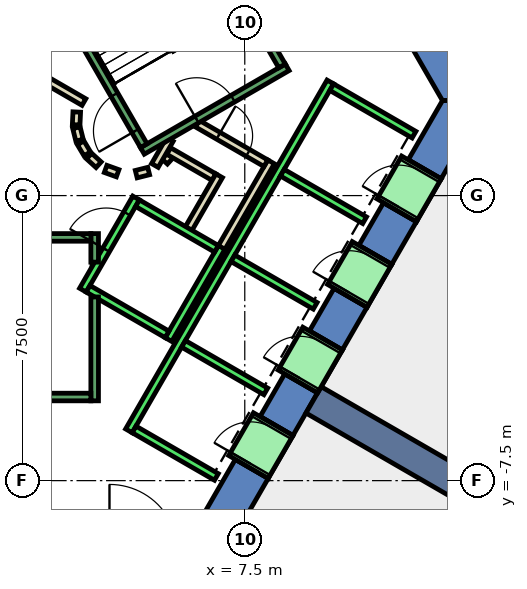
"""IFC4 building model, lengths in metres.
Left out: names, types, materials, properties, quantities, classifications, styles, units other than length and angle.
Written with IfcOpenShell. Run it as: python <this file> out.ifc"""

import sys

from ifc_helpers import new_model, si_unit, direction, frame, frame_2d, origin, place, context, subcontext, project, spatial, polyline, rectangle, outline, extrude, element, fill, save


model = new_model("IFC4")
c1 = context("Model", 3, precision=1e-05, world=origin(), true_north=direction((0.0, 1.0)))
c2 = subcontext(c1, "Body", "Model", "MODEL_VIEW")
j1 = project(units=[si_unit("LENGTHUNIT", "METRE"), si_unit("PLANEANGLEUNIT", "RADIAN")], contexts=[c1])
p1 = place(None, origin())
s1 = spatial("IfcSite", under=j1, at=p1, CompositionType="ELEMENT")
p2 = place(p1, origin())
s2 = spatial("IfcBuilding", under=s1, at=p2, CompositionType="ELEMENT")
p3 = place(p2, frame((0.0, 0.0, 15.0)))
s3 = spatial("IfcBuildingStorey", under=s2, at=p3, CompositionType="ELEMENT", Elevation=15.0)
p4 = place(p3, frame((0.0, 0.0, -0.45)))
e1 = element("IfcWall", 1, at=p4, inside=s3, PredefinedType="SHEAR", context=c2, shape_type="SweptSolid", body=[
    extrude(outline(polyline([(8.517, 11.748), (7.651, 11.248), (12.702, 2.5), (13.856, 2.5), (8.517, 11.748)])), origin(), (0.0, 0.0, 1.0), 5.0),
])
p5 = place(p3, frame((0.0, 0.0, -0.45)))
e2 = element("IfcWall", 2, at=p5, inside=s3, PredefinedType="SHEAR", context=c2, shape_type="SweptSolid", body=[
    extrude(outline(polyline([(8.117, -7.44), (7.252, -6.94), (6.351, -8.5), (6.928, -9.5), (8.117, -7.44)])), origin(), (0.0, 0.0, 1.0), 5.0),
])
p6 = place(p3, frame((0.0, 0.0, -0.45)))
e3 = element("IfcWall", 3, at=p6, inside=s3, PredefinedType="SHEAR", context=c2, shape_type="SweptSolid", body=[
    extrude(outline(polyline([(9.417, -5.189), (8.551, -4.689), (7.902, -5.814), (8.767, -6.314), (9.417, -5.189)])), origin(), (0.0, 0.0, 1.0), 5.0),
])
p7 = place(p3, frame((0.0, 0.0, -0.45)))
e4 = element("IfcWall", 4, at=p7, inside=s3, PredefinedType="SHEAR", context=c2, shape_type="SweptSolid", body=[
    extrude(outline(polyline([(10.717, -2.937), (9.851, -2.437), (9.201, -3.563), (10.067, -4.063), (10.717, -2.937)])), origin(), (0.0, 0.0, 1.0), 5.0),
])
p8 = place(p3, frame((0.0, 0.0, -0.45)))
e5 = element("IfcWall", 5, at=p8, inside=s3, PredefinedType="SHEAR", context=c2, shape_type="SweptSolid", body=[
    extrude(outline(polyline([(12.017, -0.686), (11.151, -0.186), (10.501, -1.311), (11.367, -1.811), (12.017, -0.686)])), origin(), (0.0, 0.0, 1.0), 5.0),
])
p9 = place(p3, frame((0.0, 0.0, -0.45)))
e6 = element("IfcWall", 6, at=p9, inside=s3, PredefinedType="SHEAR", context=c2, shape_type="SweptSolid", body=[
    extrude(outline(polyline([(11.801, 0.94), (12.667, 0.44), (13.856, 2.5), (12.702, 2.5), (11.801, 0.94)])), origin(), (0.0, 0.0, 1.0), 5.0),
])
p10 = place(p3, frame((0.0, 0.0, 3.6)))
e7 = element("IfcWall", 7, at=p10, inside=s3, PredefinedType="SHEAR", context=c2, shape_type="SweptSolid", body=[
    extrude(outline(polyline([(8.767, -6.314), (7.902, -5.814), (7.252, -6.94), (8.117, -7.44), (8.767, -6.314)])), origin(), (0.0, 0.0, 1.0), 0.95),
])
p11 = place(p3, frame((0.0, 0.0, 3.6)))
e8 = element("IfcWall", 8, at=p11, inside=s3, PredefinedType="SHEAR", context=c2, shape_type="SweptSolid", body=[
    extrude(outline(polyline([(10.067, -4.063), (9.201, -3.563), (8.551, -4.689), (9.417, -5.189), (10.067, -4.063)])), origin(), (0.0, 0.0, 1.0), 0.95),
])
p12 = place(p3, frame((0.0, 0.0, 3.6)))
e9 = element("IfcWall", 9, at=p12, inside=s3, PredefinedType="SHEAR", context=c2, shape_type="SweptSolid", body=[
    extrude(outline(polyline([(11.367, -1.811), (10.501, -1.311), (9.851, -2.437), (10.717, -2.937), (11.367, -1.811)])), origin(), (0.0, 0.0, 1.0), 0.95),
])
p13 = place(p3, frame((0.0, 0.0, 3.6)))
e10 = element("IfcWall", 10, at=p13, inside=s3, PredefinedType="SHEAR", context=c2, shape_type="SweptSolid", body=[
    extrude(outline(polyline([(12.667, 0.44), (11.801, 0.94), (11.151, -0.186), (12.017, -0.686), (12.667, 0.44)])), origin(), (0.0, 0.0, 1.0), 0.95),
])
p14 = place(p3, frame((9.31, -5.375, -0.45), z_axis=(0.0, 0.0, 1.0), x_axis=(0.866017533419, -0.500013631625, 0.0)))
e11 = element("IfcWall", 11, at=p14, inside=s3, PredefinedType="SHEAR", context=c2, shape_type="SweptSolid", body=[
    extrude(rectangle(XDim=9.0, YDim=0.8, at=frame_2d((4.5, 0.0))), origin(), (0.0, 0.0, 1.0), 5.0),
])
p15 = place(p3, frame((5.39, 0.898, 0.0), z_axis=(0.0, 0.0, 1.0), x_axis=(0.673828488714, 0.738887791073, 0.0)))
e12 = element("IfcWall", 12, at=p15, inside=s3, PredefinedType="PARTITIONING", context=c2, shape_type="SweptSolid", body=[
    extrude(rectangle(XDim=0.263, YDim=0.2, at=frame_2d((0.131, 0.0))), origin(), (0.0, 0.0, 1.0), 4.55),
])
p16 = place(p3, frame((5.499, 1.172, 0.0), z_axis=(0.0, 0.0, 1.0), x_axis=(0.866333505267, -0.499465972466, 0.0)))
e13 = element("IfcWall", 13, at=p16, inside=s3, PredefinedType="PARTITIONING", context=c2, shape_type="SweptSolid", body=[
    extrude(rectangle(XDim=1.374, YDim=0.2, at=frame_2d((0.687, 0.0))), origin(), (0.0, 0.0, 1.0), 4.55),
])
p17 = place(p3, frame((6.826, 0.522, 0.0), z_axis=(0.0, 0.0, 1.0), x_axis=(-0.500016722714, -0.866015748706, 0.0)))
e14 = element("IfcWall", 14, at=p17, inside=s3, PredefinedType="PARTITIONING", context=c2, shape_type="SweptSolid", body=[
    extrude(rectangle(XDim=1.7, YDim=0.2, at=frame_2d((0.85, 0.0))), origin(), (0.0, 0.0, 1.0), 4.55),
])
p18 = place(p3, frame((8.192, 0.888, 0.0), z_axis=(0.0, 0.0, 1.0), x_axis=(-0.499940625693, -0.866059680843, 0.0)))
e15 = element("IfcWall", 15, at=p18, inside=s3, PredefinedType="PARTITIONING", context=c2, shape_type="SweptSolid", body=[
    extrude(rectangle(XDim=2.68, YDim=0.2, at=frame_2d((1.34, 0.0))), origin(), (0.0, 0.0, 1.0), 4.55),
])
p19 = place(p3, frame((5.135, 0.793, 0.0), z_axis=(0.0, 0.0, 1.0), x_axis=(0.499526442893, 0.866298639529, 0.0)))
e16 = element("IfcWall", 16, at=p19, inside=s3, PredefinedType="PARTITIONING", context=c2, shape_type="SweptSolid", body=[
    extrude(rectangle(XDim=0.791, YDim=0.2, at=frame_2d((0.396, 0.0))), origin(), (0.0, 0.0, 1.0), 4.55),
])
p20 = place(p3, frame((6.25, 1.894, 0.0), z_axis=(0.0, 0.0, 1.0), x_axis=(0.866043184279, -0.499969202016, 0.0)))
e17 = element("IfcWall", 17, at=p20, inside=s3, PredefinedType="PARTITIONING", context=c2, shape_type="SweptSolid", body=[
    extrude(rectangle(XDim=2.084, YDim=0.2, at=frame_2d((1.042, 0.0))), origin(), (0.0, 0.0, 1.0), 4.55),
])
p21 = place(p20, frame((0.642, 0.0, 0.0)))
e18 = element("IfcOpeningElement", 18, at=p21, cuts=e17, PredefinedType="OPENING", context=c2, shape_type="SweptSolid", body=[
    extrude(rectangle(XDim=0.9, YDim=2.1, at=frame_2d((0.45, 1.05))), frame((0.0, 0.11, 0.0), z_axis=(0.0, -1.0, 0.0), x_axis=(1.0, 0.0, 0.0)), (0.0, 0.0, 1.0), 0.22),
])
p22 = place(p3, frame((3.079, 2.199, 0.0), z_axis=(0.0, 0.0, 1.0), x_axis=(-0.047771483479, -0.998858290933, 0.0)))
e19 = element("IfcWall", 19, at=p22, inside=s3, PredefinedType="PARTITIONING", context=c2, shape_type="SweptSolid", body=[
    extrude(rectangle(XDim=0.337, YDim=0.2, at=frame_2d((0.169, 0.0))), origin(), (0.0, 0.0, 1.0), 4.55),
])
p23 = place(p3, frame((3.07, 1.786, 0.0), z_axis=(0.0, 0.0, 1.0), x_axis=(0.242705583207, -0.970099994784, 0.0)))
e20 = element("IfcWall", 20, at=p23, inside=s3, PredefinedType="PARTITIONING", context=c2, shape_type="SweptSolid", body=[
    extrude(rectangle(XDim=0.338, YDim=0.2, at=frame_2d((0.169, 0.0))), origin(), (0.0, 0.0, 1.0), 4.55),
])
for number, where, z_axis, x_axis in (
    (21, (3.182, 1.388, 0.0), (0.0, 0.0, 1.0), (0.512, -0.859, 0.0)),
    (22, (3.404, 1.039, 0.0), (0.0, 0.0, 1.0), (0.74, -0.672, 0.0)),
):
    element("IfcWall", number, at=place(p3, frame(where, z_axis=z_axis, x_axis=x_axis)), inside=s3, PredefinedType="PARTITIONING", context=c2, shape_type="SweptSolid", body=[
        extrude(rectangle(XDim=0.338, YDim=0.2, at=frame_2d((0.169, 0.0))), origin(), (0.0, 0.0, 1.0), 4.55),
    ])
p24 = place(p3, frame((3.838, 0.702, 0.0), z_axis=(0.0, 0.0, 1.0), x_axis=(0.941035081519, -0.338308993895, 0.0)))
e23 = element("IfcWall", 23, at=p24, inside=s3, PredefinedType="PARTITIONING", context=c2, shape_type="SweptSolid", body=[
    extrude(rectangle(XDim=0.337, YDim=0.2, at=frame_2d((0.168, 0.0))), origin(), (0.0, 0.0, 1.0), 4.55),
])
p25 = place(p3, frame((4.644, 0.564, 0.0), z_axis=(0.0, 0.0, 1.0), x_axis=(0.969929076366, 0.243387729394, 0.0)))
e24 = element("IfcWall", 24, at=p25, inside=s3, PredefinedType="PARTITIONING", context=c2, shape_type="SweptSolid", body=[
    extrude(rectangle(XDim=0.337, YDim=0.2, at=frame_2d((0.168, 0.0))), origin(), (0.0, 0.0, 1.0), 4.55),
])
p26 = place(p3, frame((2.012, 3.186, 0.0), z_axis=(0.0, 0.0, 1.0), x_axis=(0.865891012941, -0.500232699559, 0.0)))
e25 = element("IfcWall", 25, at=p26, inside=s3, PredefinedType="PARTITIONING", context=c2, shape_type="SweptSolid", body=[
    extrude(rectangle(XDim=1.449, YDim=0.2, at=frame_2d((0.725, 0.0))), origin(), (0.0, 0.0, 1.0), 4.55),
])
p27 = place(p3, frame((3.24, -2.488, 0.0), z_axis=(0.0, 0.0, 1.0), x_axis=(0.49994636267, 0.866056369097, 0.0)))
e26 = element("IfcWall", 26, at=p27, inside=s3, PredefinedType="STANDARD", context=c2, shape_type="SweptSolid", body=[
    extrude(rectangle(XDim=2.8, YDim=0.2, at=frame_2d((1.4, 0.0))), origin(), (0.0, 0.0, 1.0), 4.55),
])
p28 = place(p27, frame((1.225, 0.0, 0.0)))
e27 = element("IfcOpeningElement", 27, at=p28, cuts=e26, PredefinedType="OPENING", context=c2, shape_type="SweptSolid", body=[
    extrude(rectangle(XDim=1.1, YDim=2.1, at=frame_2d((0.55, 1.05))), frame((0.0, 0.11, 0.0), z_axis=(0.0, -1.0, 0.0), x_axis=(1.0, 0.0, 0.0)), (0.0, 0.0, 1.0), 0.22),
])
p29 = place(p3, frame((5.492, -3.788, 0.0), z_axis=(0.0, 0.0, 1.0), x_axis=(0.500011755427, 0.866018616679, 0.0)))
e28 = element("IfcWall", 28, at=p29, inside=s3, PredefinedType="STANDARD", context=c2, shape_type="SweptSolid", body=[
    extrude(rectangle(XDim=2.8, YDim=0.2, at=frame_2d((1.4, 0.0))), origin(), (0.0, 0.0, 1.0), 4.55),
])
p30 = place(p3, frame((3.377, -2.452, 0.0), z_axis=(0.0, 0.0, 1.0), x_axis=(0.865955154139, -0.50012165622, 0.0)))
e29 = element("IfcWall", 29, at=p30, inside=s3, PredefinedType="STANDARD", context=c2, shape_type="SweptSolid", body=[
    extrude(rectangle(XDim=2.4, YDim=0.2, at=frame_2d((1.2, 0.0))), origin(), (0.0, 0.0, 1.0), 4.55),
])
p31 = place(p3, frame((4.677, -0.2, 0.0), z_axis=(0.0, 0.0, 1.0), x_axis=(0.865973769406, -0.500089422704, 0.0)))
e30 = element("IfcWall", 30, at=p31, inside=s3, PredefinedType="STANDARD", context=c2, shape_type="SweptSolid", body=[
    extrude(rectangle(XDim=2.399, YDim=0.2, at=frame_2d((1.2, 0.0))), origin(), (0.0, 0.0, 1.0), 4.55),
])
p32 = place(p3, frame((4.451, -6.19, 0.0), z_axis=(0.0, 0.0, 1.0), x_axis=(0.50000090737, 0.866024879913, 0.0)))
e31 = element("IfcWall", 31, at=p32, inside=s3, PredefinedType="STANDARD", context=c2, shape_type="SweptSolid", body=[
    extrude(rectangle(XDim=10.6, YDim=0.2, at=frame_2d((5.3, 0.0))), origin(), (0.0, 0.0, 1.0), 4.55),
])
for number, where, z_axis, x_axis in (
    (32, (4.588, -6.153, 0.0), (0.0, 0.0, 1.0), (0.866, -0.5, 0.0)),
    (33, (5.888, -3.902, 0.0), (0.0, 0.0, 1.0), (0.866, -0.5, 0.0)),
    (34, (7.188, -1.65, 0.0), (0.0, 0.0, 1.0), (0.866, -0.5, 0.0)),
    (35, (8.488, 0.602, 0.0), (0.0, 0.0, 1.0), (0.866, -0.5, 0.0)),
):
    element("IfcWall", number, at=place(p3, frame(where, z_axis=z_axis, x_axis=x_axis)), inside=s3, PredefinedType="STANDARD", context=c2, shape_type="SweptSolid", body=[
        extrude(rectangle(XDim=2.5, YDim=0.2, at=frame_2d((1.25, 0.0))), origin(), (0.0, 0.0, 1.0), 4.55),
    ])
p33 = place(p3, frame((9.788, 2.853, 0.0), z_axis=(0.0, 0.0, 1.0), x_axis=(0.865998541277, -0.500046524342, 0.0)))
e36 = element("IfcWall", 36, at=p33, inside=s3, PredefinedType="STANDARD", context=c2, shape_type="SweptSolid", body=[
    extrude(rectangle(XDim=2.5, YDim=0.2, at=frame_2d((1.25, 0.0))), origin(), (0.0, 0.0, 1.0), 4.55),
])
p34 = place(p3, frame((7.598, -7.14, 0.0), z_axis=(0.0, 0.0, 1.0), x_axis=(0.500362116554, 0.865816234728, 0.0)))
e37 = element("IfcWall", 37, at=p34, inside=s3, PredefinedType="STANDARD", context=c2, shape_type="SweptSolid", body=[
    extrude(rectangle(XDim=1.299, YDim=1.2, at=frame_2d((0.65, 0.0))), origin(), (0.0, 0.0, 1.0), 2.4),
])
p35 = place(p34, frame((0.1, 0.0, 0.0)))
e38 = element("IfcOpeningElement", 38, at=p35, cuts=e37, PredefinedType="OPENING", context=c2, shape_type="SweptSolid", body=[
    extrude(rectangle(XDim=1.1, YDim=2.3, at=frame_2d((0.55, 1.15))), frame((0.0, 0.61, 0.0), z_axis=(0.0, -1.0, 0.0), x_axis=(1.0, 0.0, 0.0)), (0.0, 0.0, 1.0), 1.22),
])
p36 = place(p3, frame((8.898, -4.889, 0.0), z_axis=(0.0, 0.0, 1.0), x_axis=(0.500036693733, 0.866004217611, 0.0)))
e39 = element("IfcWall", 39, at=p36, inside=s3, PredefinedType="STANDARD", context=c2, shape_type="SweptSolid", body=[
    extrude(rectangle(XDim=1.3, YDim=1.2, at=frame_2d((0.65, 0.0))), origin(), (0.0, 0.0, 1.0), 2.4),
])
p37 = place(p36, frame((0.1, 0.0, 0.0)))
e40 = element("IfcOpeningElement", 40, at=p37, cuts=e39, PredefinedType="OPENING", context=c2, shape_type="SweptSolid", body=[
    extrude(rectangle(XDim=1.1, YDim=2.3, at=frame_2d((0.55, 1.15))), frame((0.0, 0.61, 0.0), z_axis=(0.0, -1.0, 0.0), x_axis=(1.0, 0.0, 0.0)), (0.0, 0.0, 1.0), 1.22),
])
p38 = place(p3, frame((10.198, -2.637, 0.0), z_axis=(0.0, 0.0, 1.0), x_axis=(0.49989585183, 0.866085525409, 0.0)))
e41 = element("IfcWall", 41, at=p38, inside=s3, PredefinedType="STANDARD", context=c2, shape_type="SweptSolid", body=[
    extrude(rectangle(XDim=1.3, YDim=1.2, at=frame_2d((0.65, 0.0))), origin(), (0.0, 0.0, 1.0), 2.4),
])
p39 = place(p38, frame((0.1, 0.0, 0.0)))
e42 = element("IfcOpeningElement", 42, at=p39, cuts=e41, PredefinedType="OPENING", context=c2, shape_type="SweptSolid", body=[
    extrude(rectangle(XDim=1.1, YDim=2.3, at=frame_2d((0.55, 1.15))), frame((0.0, 0.61, 0.0), z_axis=(0.0, -1.0, 0.0), x_axis=(1.0, 0.0, 0.0)), (0.0, 0.0, 1.0), 1.22),
])
p40 = place(p3, frame((11.498, -0.385, 0.0), z_axis=(0.0, 0.0, 1.0), x_axis=(0.500221244143, 0.865897630733, 0.0)))
e43 = element("IfcWall", 43, at=p40, inside=s3, PredefinedType="STANDARD", context=c2, shape_type="SweptSolid", body=[
    extrude(rectangle(XDim=1.299, YDim=1.2, at=frame_2d((0.65, 0.0))), origin(), (0.0, 0.0, 1.0), 2.4),
])
p41 = place(p40, frame((0.1, 0.0, 0.0)))
e44 = element("IfcOpeningElement", 44, at=p41, cuts=e43, PredefinedType="OPENING", context=c2, shape_type="SweptSolid", body=[
    extrude(rectangle(XDim=1.1, YDim=2.3, at=frame_2d((0.55, 1.15))), frame((0.0, 0.61, 0.0), z_axis=(0.0, -1.0, 0.0), x_axis=(1.0, 0.0, 0.0)), (0.0, 0.0, 1.0), 1.22),
])
p42 = place(p3, frame((3.55, -2.667, 0.0), z_axis=(0.0, 0.0, 1.0), x_axis=(0.0, -1.0, 0.0)))
e45 = element("IfcWall", 45, at=p42, inside=s3, PredefinedType="STANDARD", context=c2, shape_type="SweptSolid", body=[
    extrude(rectangle(XDim=2.733, YDim=0.2, at=frame_2d((1.366, 0.0))), origin(), (0.0, 0.0, 1.0), 4.55),
])
p43 = place(p3, frame((3.55, -1.0, 0.0), z_axis=(0.0, 0.0, 1.0), x_axis=(0.0, -1.0, 0.0)))
e46 = element("IfcWall", 46, at=p43, inside=s3, PredefinedType="STANDARD", context=c2, shape_type="SweptSolid", body=[
    extrude(rectangle(XDim=0.751, YDim=0.2, at=frame_2d((0.375, 0.0))), origin(), (0.0, 0.0, 1.0), 4.55),
])
p44 = place(p3, frame((-3.45, -1.1, 0.0), z_axis=(0.0, 0.0, 1.0), x_axis=(1.0, 0.0, 0.0)))
e47 = element("IfcWall", 47, at=p44, inside=s3, PredefinedType="STANDARD", context=c2, shape_type="SweptSolid", body=[
    extrude(rectangle(XDim=6.9, YDim=0.2, at=frame_2d((3.45, 0.0))), origin(), (0.0, 0.0, 1.0), 4.55),
])
p45 = place(p44, frame((0.45, 0.0, 0.0)))
e48 = element("IfcOpeningElement", 48, at=p45, cuts=e47, PredefinedType="OPENING", context=c2, shape_type="SweptSolid", body=[
    extrude(rectangle(XDim=1.1, YDim=2.2, at=frame_2d((0.55, 1.1))), frame((0.0, 0.11, 0.0), z_axis=(0.0, -1.0, 0.0), x_axis=(1.0, 0.0, 0.0)), (0.0, 0.0, 1.0), 0.22),
])
p46 = place(p3, frame((-3.45, -5.3, 0.0), z_axis=(0.0, 0.0, 1.0), x_axis=(1.0, 0.0, 0.0)))
e49 = element("IfcWall", 49, at=p46, inside=s3, PredefinedType="STANDARD", context=c2, shape_type="SweptSolid", body=[
    extrude(rectangle(XDim=6.9, YDim=0.2, at=frame_2d((3.45, 0.0))), origin(), (0.0, 0.0, 1.0), 4.55),
])
p47 = place(p3, frame((4.806, 1.176, 0.0), z_axis=(0.0, 0.0, 1.0), x_axis=(0.866059941101, 0.499940174841, 0.0)))
e50 = element("IfcWall", 50, at=p47, inside=s3, PredefinedType="STANDARD", context=c2, shape_type="SweptSolid", body=[
    extrude(rectangle(XDim=4.4, YDim=0.2, at=frame_2d((2.2, 0.0))), origin(), (0.0, 0.0, 1.0), 4.55),
])
p48 = place(p47, frame((1.65, 0.0, 0.0)))
e51 = element("IfcOpeningElement", 51, at=p48, cuts=e50, PredefinedType="OPENING", context=c2, shape_type="SweptSolid", body=[
    extrude(rectangle(XDim=1.1, YDim=2.2, at=frame_2d((0.55, 1.1))), frame((0.0, 0.11, 0.0), z_axis=(0.0, -1.0, 0.0), x_axis=(1.0, 0.0, 0.0)), (0.0, 0.0, 1.0), 0.22),
])
p49 = place(p3, frame((4.843, 1.312, 0.0), z_axis=(0.0, 0.0, 1.0), x_axis=(-0.499963383562, 0.866046543262, 0.0)))
e52 = element("IfcWall", 52, at=p49, inside=s3, PredefinedType="STANDARD", context=c2, shape_type="SweptSolid", body=[
    extrude(rectangle(XDim=6.9, YDim=0.2, at=frame_2d((3.45, 0.0))), origin(), (0.0, 0.0, 1.0), 4.55),
])
p50 = place(p49, frame((0.45, 0.0, 0.0)))
e53 = element("IfcOpeningElement", 53, at=p50, cuts=e52, PredefinedType="OPENING", context=c2, shape_type="SweptSolid", body=[
    extrude(rectangle(XDim=1.1, YDim=2.2, at=frame_2d((0.55, 1.1))), frame((0.0, 0.11, 0.0), z_axis=(0.0, -1.0, 0.0), x_axis=(1.0, 0.0, 0.0)), (0.0, 0.0, 1.0), 0.22),
])
p51 = place(p3, frame((8.48, 3.412, 0.0), z_axis=(0.0, 0.0, 1.0), x_axis=(-0.499978703459, 0.866037698999, 0.0)))
e54 = element("IfcWall", 54, at=p51, inside=s3, PredefinedType="STANDARD", context=c2, shape_type="SweptSolid", body=[
    extrude(rectangle(XDim=6.9, YDim=0.2, at=frame_2d((3.45, 0.0))), origin(), (0.0, 0.0, 1.0), 4.55),
])
p52 = place(p21, origin())
e55 = element("IfcDoor", 55, at=p52, inside=s3, OperationType="SINGLE_SWING_LEFT", PredefinedType="DOOR", context=c2, shape_type="SweptSolid", body=[
    extrude(rectangle(XDim=0.9, YDim=2.1, at=frame_2d((0.45, 1.05))), frame((0.0, 0.025, 0.0), z_axis=(0.0, -1.0, 0.0), x_axis=(1.0, 0.0, 0.0)), (0.0, 0.0, 1.0), 0.05),
])
fill(e18, e55)
p53 = place(p35, origin())
e56 = element("IfcDoor", 56, at=p53, inside=s3, OperationType="SLIDING_TO_LEFT", PredefinedType="DOOR", context=c2, shape_type="SweptSolid", body=[
    extrude(rectangle(XDim=1.1, YDim=2.3, at=frame_2d((0.55, 1.15))), frame((0.0, 0.025, 0.0), z_axis=(0.0, -1.0, 0.0), x_axis=(1.0, 0.0, 0.0)), (0.0, 0.0, 1.0), 0.05),
])
fill(e38, e56)
p54 = place(p37, origin())
e57 = element("IfcDoor", 57, at=p54, inside=s3, OperationType="SLIDING_TO_LEFT", PredefinedType="DOOR", context=c2, shape_type="SweptSolid", body=[
    extrude(rectangle(XDim=1.1, YDim=2.3, at=frame_2d((0.55, 1.15))), frame((0.0, 0.025, 0.0), z_axis=(0.0, -1.0, 0.0), x_axis=(1.0, 0.0, 0.0)), (0.0, 0.0, 1.0), 0.05),
])
fill(e40, e57)
p55 = place(p39, origin())
e58 = element("IfcDoor", 58, at=p55, inside=s3, OperationType="SLIDING_TO_LEFT", PredefinedType="DOOR", context=c2, shape_type="SweptSolid", body=[
    extrude(rectangle(XDim=1.1, YDim=2.3, at=frame_2d((0.55, 1.15))), frame((0.0, 0.025, 0.0), z_axis=(0.0, -1.0, 0.0), x_axis=(1.0, 0.0, 0.0)), (0.0, 0.0, 1.0), 0.05),
])
fill(e42, e58)
p56 = place(p41, origin())
e59 = element("IfcDoor", 59, at=p56, inside=s3, OperationType="SLIDING_TO_LEFT", PredefinedType="DOOR", context=c2, shape_type="SweptSolid", body=[
    extrude(rectangle(XDim=1.1, YDim=2.3, at=frame_2d((0.55, 1.15))), frame((0.0, 0.025, 0.0), z_axis=(0.0, -1.0, 0.0), x_axis=(1.0, 0.0, 0.0)), (0.0, 0.0, 1.0), 0.05),
])
fill(e44, e59)
p57 = place(p28, origin())
e60 = element("IfcDoor", 60, at=p57, inside=s3, OperationType="SLIDING_TO_LEFT", PredefinedType="DOOR", context=c2, shape_type="SweptSolid", body=[
    extrude(rectangle(XDim=1.1, YDim=2.1, at=frame_2d((0.55, 1.05))), frame((0.0, 0.025, 0.0), z_axis=(0.0, -1.0, 0.0), x_axis=(1.0, 0.0, 0.0)), (0.0, 0.0, 1.0), 0.05),
])
fill(e27, e60)
p58 = place(p50, origin())
e61 = element("IfcDoor", 61, at=p58, inside=s3, OperationType="SINGLE_SWING_LEFT", PredefinedType="DOOR", context=c2, shape_type="SweptSolid", body=[
    extrude(rectangle(XDim=1.1, YDim=2.2, at=frame_2d((0.55, 1.1))), frame((0.0, 0.025, 0.0), z_axis=(0.0, -1.0, 0.0), x_axis=(1.0, 0.0, 0.0)), (0.0, 0.0, 1.0), 0.05),
])
fill(e53, e61)
p59 = place(p48, origin())
e62 = element("IfcDoor", 62, at=p59, inside=s3, OperationType="SINGLE_SWING_LEFT", PredefinedType="DOOR", context=c2, shape_type="SweptSolid", body=[
    extrude(rectangle(XDim=1.1, YDim=2.2, at=frame_2d((0.55, 1.1))), frame((0.0, 0.025, 0.0), z_axis=(0.0, -1.0, 0.0), x_axis=(1.0, 0.0, 0.0)), (0.0, 0.0, 1.0), 0.05),
])
fill(e51, e62)
save(model, sys.argv[1])
